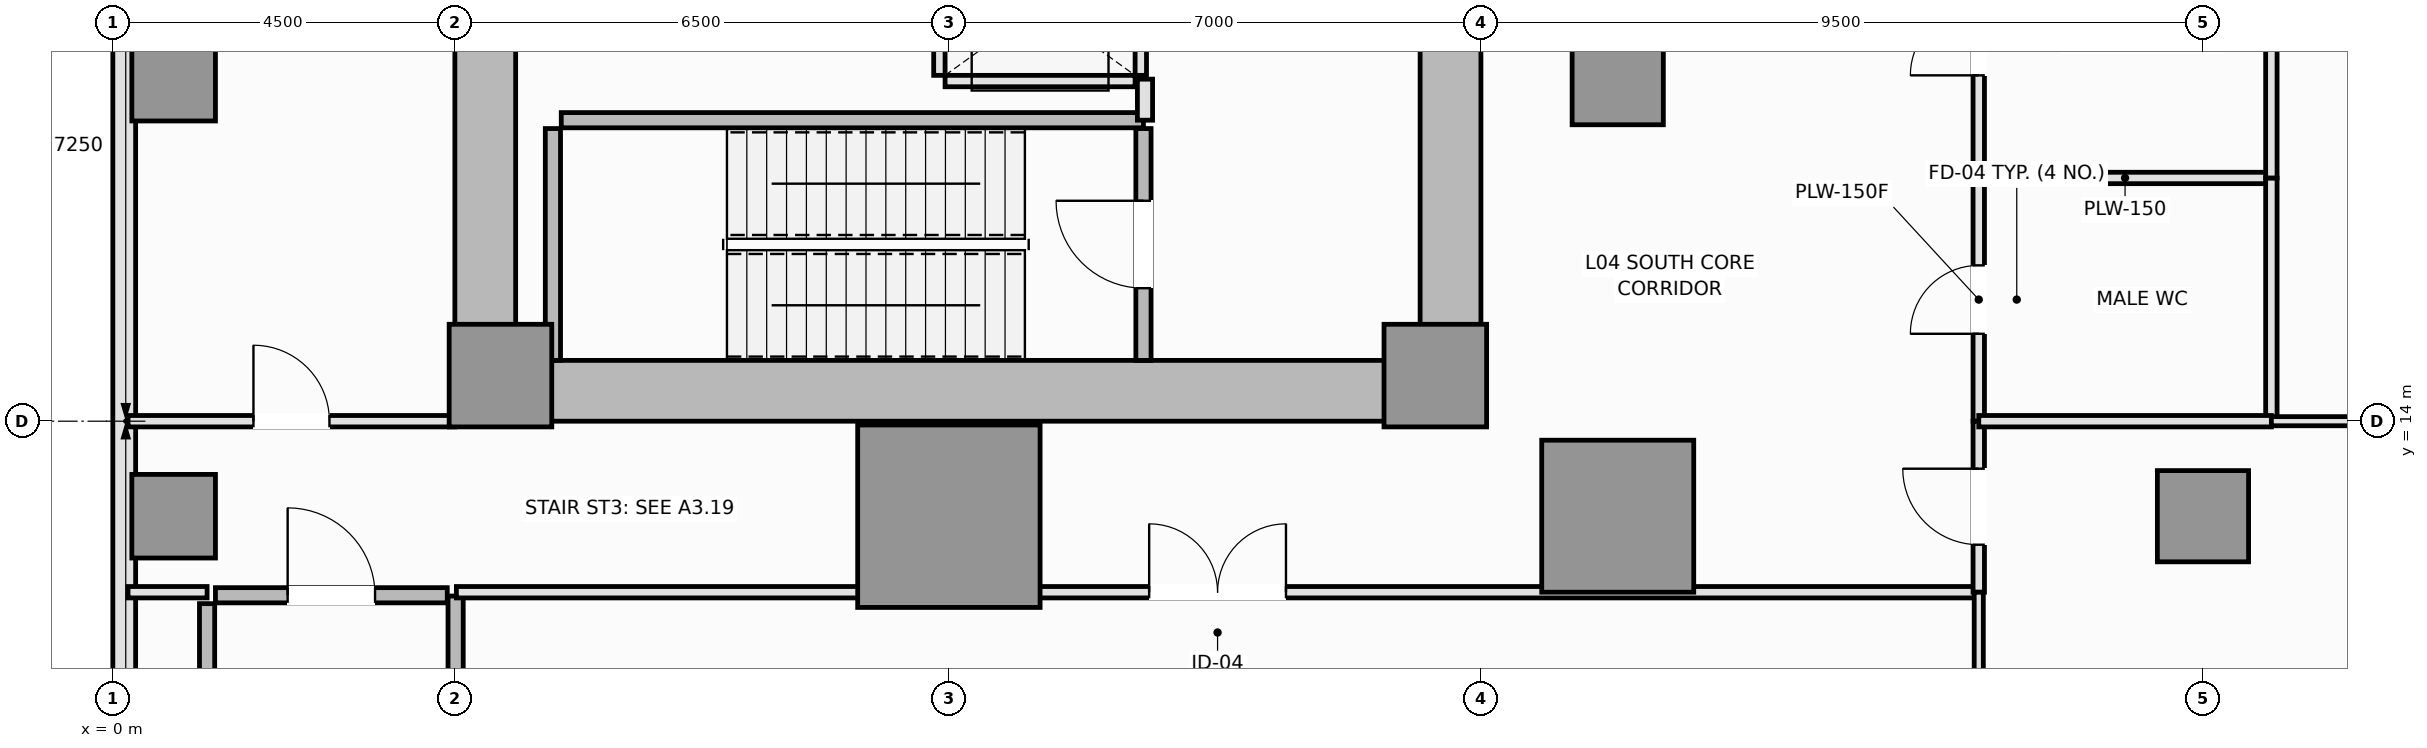
"""IFC4 building model, lengths in metres.
Left out: names, types, materials, properties, quantities, classifications, styles, units other than length and angle.
Written with IfcOpenShell. Run it as: python <this file> out.ifc"""

import sys

from ifc_helpers import new_model, si_unit, direction, frame, frame_2d, origin, origin_2d, place, context, subcontext, project, spatial, rectangle, extrude, element, fill, save


model = new_model("IFC4")
c1 = context("Model", 3, precision=1e-05, world=origin(), true_north=direction((0.0, 1.0)))
c2 = subcontext(c1, "Body", "Model", "MODEL_VIEW")
j1 = project(units=[si_unit("LENGTHUNIT", "METRE"), si_unit("PLANEANGLEUNIT", "RADIAN")], contexts=[c1])
p1 = place(None, origin())
s1 = spatial("IfcSite", under=j1, at=p1, CompositionType="ELEMENT")
p2 = place(p1, origin())
s2 = spatial("IfcBuilding", under=s1, at=p2, CompositionType="ELEMENT")
p3 = place(p2, frame((0.0, 0.0, 20.4)))
s3 = spatial("IfcBuildingStorey", under=s2, at=p3, CompositionType="ELEMENT", Elevation=20.4)
p4 = place(p3, frame((4.5, 14.4, 0.0), z_axis=(0.0, 0.0, 1.0), x_axis=(1.0, 0.0, 0.0)))
e1 = element("IfcWall", 1, at=p4, inside=s3, PredefinedType="SHEAR", context=c2, shape_type="SweptSolid", body=[
    extrude(rectangle(XDim=13.5, YDim=0.8, at=frame_2d((6.75, 0.0))), origin(), (0.0, 0.0, 1.0), 5.2),
])
p5 = place(p3, frame((4.9, 14.8, 0.0), z_axis=(0.0, 0.0, 1.0), x_axis=(0.0, 1.0, 0.0)))
e2 = element("IfcWall", 2, at=p5, inside=s3, PredefinedType="SHEAR", context=c2, shape_type="SweptSolid", body=[
    extrude(rectangle(XDim=20.9, YDim=0.8, at=frame_2d((10.45, 0.0))), origin(), (0.0, 0.0, 1.0), 5.2),
])
p6 = place(p3, frame((17.6, 14.8, 0.0), z_axis=(0.0, 0.0, 1.0), x_axis=(0.0, 1.0, 0.0)))
e3 = element("IfcWall", 3, at=p6, inside=s3, PredefinedType="SHEAR", context=c2, shape_type="SweptSolid", body=[
    extrude(rectangle(XDim=8.65, YDim=0.8, at=frame_2d((4.325, 0.0))), origin(), (0.0, 0.0, 1.0), 5.2),
])
p7 = place(p6, frame((4.1, 0.0, 0.0)))
e4 = element("IfcOpeningElement", 4, at=p7, cuts=e3, PredefinedType="OPENING", context=c2, shape_type="SweptSolid", body=[
    extrude(rectangle(XDim=1.1, YDim=2.15, at=frame_2d((0.55, 1.075))), frame((0.0, 0.41, 0.0), z_axis=(0.0, -1.0, 0.0), x_axis=(1.0, 0.0, 0.0)), (0.0, 0.0, 1.0), 0.82),
])
for number, where, z_axis, x_axis in (
    (5, (5.1, 14.6, 0.0), (0.0, 0.0, 1.0), (1.0, 0.0, 0.0)),
    (6, (17.4, 14.6, 0.0), (0.0, 0.0, 1.0), (1.0, 0.0, 0.0)),
):
    element("IfcColumn", number, at=place(p3, frame(where, z_axis=z_axis, x_axis=x_axis)), inside=s3, PredefinedType="PILASTER", context=c2, shape_type="SweptSolid", body=[
        extrude(rectangle(XDim=1.35, YDim=1.35, at=origin_2d()), origin(), (0.0, 0.0, 1.0), 5.2),
    ])
p8 = place(p3, frame((11.0, 12.75, 0.0), z_axis=(0.0, 0.0, 1.0), x_axis=(1.0, 0.0, 0.0)))
e7 = element("IfcColumn", 7, at=p8, inside=s3, PredefinedType="COLUMN", context=c2, shape_type="SweptSolid", body=[
    extrude(rectangle(XDim=2.4, YDim=2.4, at=origin_2d()), origin(), (0.0, 0.0, 1.0), 5.2),
])
p9 = place(p3, frame((27.5, 12.75, 0.0), z_axis=(0.0, 0.0, 1.0), x_axis=(1.0, 0.0, 0.0)))
e8 = element("IfcColumn", 8, at=p9, inside=s3, PredefinedType="COLUMN", context=c2, shape_type="SweptSolid", body=[
    extrude(rectangle(XDim=1.2, YDim=1.2, at=origin_2d()), origin(), (0.0, 0.0, 1.0), 5.2),
])
p10 = place(p3, frame((19.8, 12.75, 0.0), z_axis=(0.0, 0.0, 1.0), x_axis=(1.0, 0.0, 0.0)))
e9 = element("IfcColumn", 9, at=p10, inside=s3, PredefinedType="COLUMN", context=c2, shape_type="SweptSolid", body=[
    extrude(rectangle(XDim=2.0, YDim=2.0, at=origin_2d()), origin(), (0.0, 0.0, 1.0), 5.2),
])
p11 = place(p3, frame((19.8, 18.5, 0.0), z_axis=(0.0, 0.0, 1.0), x_axis=(1.0, 0.0, 0.0)))
e10 = element("IfcColumn", 10, at=p11, inside=s3, PredefinedType="COLUMN", context=c2, shape_type="SweptSolid", body=[
    extrude(rectangle(XDim=1.2, YDim=1.2, at=origin_2d()), origin(), (0.0, 0.0, 1.0), 5.2),
])
for number, where, z_axis, x_axis in (
    (11, (0.8, 12.75, 0.0), (0.0, 0.0, 1.0), (1.0, 0.0, 0.0)),
    (12, (0.8, 18.5, 0.0), (0.0, 0.0, 1.0), (1.0, 0.0, 0.0)),
):
    element("IfcColumn", number, at=place(p3, frame(where, z_axis=z_axis, x_axis=x_axis)), inside=s3, PredefinedType="COLUMN", context=c2, shape_type="SweptSolid", body=[
        extrude(rectangle(XDim=1.1, YDim=1.1, at=origin_2d()), origin(), (0.0, 0.0, 1.0), 5.2),
    ])
p12 = place(p3, frame((0.15, 50.35, 0.0), z_axis=(0.0, 0.0, 1.0), x_axis=(0.0, -1.0, 0.0)))
e13 = element("IfcWall", 13, at=p12, inside=s3, PredefinedType="SOLIDWALL", context=c2, shape_type="SweptSolid", body=[
    extrude(rectangle(XDim=50.2, YDim=0.3, at=frame_2d((25.1, 0.0))), origin(), (0.0, 0.0, 1.0), 5.02),
])
p13 = place(p12, frame((6.5, 0.0, 0.9)))
e14 = element("IfcOpeningElement", 14, at=p13, cuts=e13, PredefinedType="OPENING", context=c2, shape_type="SweptSolid", body=[
    extrude(rectangle(XDim=2.6, YDim=2.2, at=frame_2d((1.3, 1.1))), frame((0.0, 0.16, 0.0), z_axis=(0.0, -1.0, 0.0), x_axis=(1.0, 0.0, 0.0)), (0.0, 0.0, 1.0), 0.32),
])
p14 = place(p12, frame((42.0, 0.0, 0.9)))
e15 = element("IfcOpeningElement", 15, at=p14, cuts=e13, PredefinedType="OPENING", context=c2, shape_type="SweptSolid", body=[
    extrude(rectangle(XDim=2.6, YDim=2.2, at=frame_2d((1.3, 1.1))), frame((0.0, 0.16, 0.0), z_axis=(0.0, -1.0, 0.0), x_axis=(1.0, 0.0, 0.0)), (0.0, 0.0, 1.0), 0.32),
])
p15 = place(p3, frame((5.79, 14.8, 0.0), z_axis=(0.0, 0.0, 1.0), x_axis=(0.0, 1.0, 0.0)))
e16 = element("IfcWall", 16, at=p15, inside=s3, PredefinedType="SOLIDWALL", context=c2, shape_type="SweptSolid", body=[
    extrude(rectangle(XDim=3.05, YDim=0.2, at=frame_2d((1.525, 0.0))), origin(), (0.0, 0.0, 1.0), 5.2),
])
p16 = place(p3, frame((5.9, 17.96, 0.0), z_axis=(0.0, 0.0, 1.0), x_axis=(1.0, 0.0, 0.0)))
e17 = element("IfcWall", 17, at=p16, inside=s3, PredefinedType="SOLIDWALL", context=c2, shape_type="SweptSolid", body=[
    extrude(rectangle(XDim=7.66, YDim=0.2, at=frame_2d((3.83, 0.0))), origin(), (0.0, 0.0, 1.0), 5.2),
])
p17 = place(p3, frame((13.56, 14.8, 0.0), z_axis=(0.0, 0.0, 1.0), x_axis=(0.0, 1.0, 0.0)))
e18 = element("IfcWall", 18, at=p17, inside=s3, PredefinedType="SOLIDWALL", context=c2, shape_type="SweptSolid", body=[
    extrude(rectangle(XDim=3.05, YDim=0.2, at=frame_2d((1.525, 0.0))), origin(), (0.0, 0.0, 1.0), 5.2),
])
p18 = place(p17, frame((0.95, 0.0, 0.0)))
e19 = element("IfcOpeningElement", 19, at=p18, cuts=e18, PredefinedType="OPENING", context=c2, shape_type="SweptSolid", body=[
    extrude(rectangle(XDim=1.15, YDim=2.15, at=frame_2d((0.575, 1.075))), frame((0.0, 0.11, 0.0), z_axis=(0.0, -1.0, 0.0), x_axis=(1.0, 0.0, 0.0)), (0.0, 0.0, 1.0), 0.22),
])
p19 = place(p3, frame((1.24, 4.05, 0.0), z_axis=(0.0, 0.0, 1.0), x_axis=(0.0, 1.0, 0.0)))
e20 = element("IfcWall", 20, at=p19, inside=s3, PredefinedType="SOLIDWALL", context=c2, shape_type="SweptSolid", body=[
    extrude(rectangle(XDim=7.55, YDim=0.2, at=frame_2d((3.775, 0.0))), origin(), (0.0, 0.0, 1.0), 5.2),
])
p20 = place(p3, frame((4.51, 4.05, 0.0), z_axis=(0.0, 0.0, 1.0), x_axis=(0.0, 1.0, 0.0)))
e21 = element("IfcWall", 21, at=p20, inside=s3, PredefinedType="SOLIDWALL", context=c2, shape_type="SweptSolid", body=[
    extrude(rectangle(XDim=7.65, YDim=0.2, at=frame_2d((3.825, 0.0))), origin(), (0.0, 0.0, 1.0), 5.2),
])
p21 = place(p3, frame((1.35, 11.71, 0.0), z_axis=(0.0, 0.0, 1.0), x_axis=(1.0, 0.0, 0.0)))
e22 = element("IfcWall", 22, at=p21, inside=s3, PredefinedType="SOLIDWALL", context=c2, shape_type="SweptSolid", body=[
    extrude(rectangle(XDim=3.05, YDim=0.2, at=frame_2d((1.525, 0.0))), origin(), (0.0, 0.0, 1.0), 5.2),
])
p22 = place(p21, frame((0.95, 0.0, 0.0)))
e23 = element("IfcOpeningElement", 23, at=p22, cuts=e22, PredefinedType="OPENING", context=c2, shape_type="SweptSolid", body=[
    extrude(rectangle(XDim=1.15, YDim=2.15, at=frame_2d((0.575, 1.075))), frame((0.0, 0.11, 0.0), z_axis=(0.0, -1.0, 0.0), x_axis=(1.0, 0.0, 0.0)), (0.0, 0.0, 1.0), 0.22),
])
p23 = place(p3, frame((10.95, 18.475, 0.0), z_axis=(0.0, 0.0, 1.0), x_axis=(1.0, 0.0, 0.0)))
e24 = element("IfcWall", 24, at=p23, inside=s3, PredefinedType="PARTITIONING", context=c2, shape_type="SweptSolid", body=[
    extrude(rectangle(XDim=2.5, YDim=0.15, at=frame_2d((1.25, 0.0))), origin(), (0.0, 0.0, 1.0), 5.02),
])
p24 = place(p3, frame((10.875, 18.55, 0.0), z_axis=(0.0, 0.0, 1.0), x_axis=(0.0, 1.0, 0.0)))
e25 = element("IfcWall", 25, at=p24, inside=s3, PredefinedType="PARTITIONING", context=c2, shape_type="SweptSolid", body=[
    extrude(rectangle(XDim=1.8, YDim=0.15, at=frame_2d((0.9, 0.0))), origin(), (0.0, 0.0, 1.0), 5.02),
])
p25 = place(p3, frame((13.525, 18.55, 0.0), z_axis=(0.0, 0.0, 1.0), x_axis=(0.0, 1.0, 0.0)))
e26 = element("IfcWall", 26, at=p25, inside=s3, PredefinedType="PARTITIONING", context=c2, shape_type="SweptSolid", body=[
    extrude(rectangle(XDim=1.8, YDim=0.15, at=frame_2d((0.9, 0.0))), origin(), (0.0, 0.0, 1.0), 5.02),
])
p26 = place(p25, frame((0.35, 0.0, 0.0)))
e27 = element("IfcOpeningElement", 27, at=p26, cuts=e26, PredefinedType="OPENING", context=c2, shape_type="SweptSolid", body=[
    extrude(rectangle(XDim=1.1, YDim=2.2, at=frame_2d((0.55, 1.1))), frame((0.0, 0.085, 0.0), z_axis=(0.0, -1.0, 0.0), x_axis=(1.0, 0.0, 0.0)), (0.0, 0.0, 1.0), 0.17),
])
p27 = place(p3, frame((13.58, 17.96, 0.0), z_axis=(0.0, 0.0, 1.0), x_axis=(0.0, 1.0, 0.0)))
e28 = element("IfcWall", 28, at=p27, inside=s3, PredefinedType="PARTITIONING", context=c2, shape_type="SweptSolid", body=[
    extrude(rectangle(XDim=0.54, YDim=0.2, at=frame_2d((0.27, 0.0))), origin(), (0.0, 0.0, 1.0), 5.02),
])
p28 = place(p3, frame((24.55, 14.0, 0.0), z_axis=(0.0, 0.0, 1.0), x_axis=(0.0, 1.0, 0.0)))
e29 = element("IfcWall", 29, at=p28, inside=s3, PredefinedType="PLUMBINGWALL", context=c2, shape_type="SweptSolid", body=[
    extrude(rectangle(XDim=3.2, YDim=0.15, at=frame_2d((1.6, 0.0))), origin(), (0.0, 0.0, 1.0), 5.02),
])
p29 = place(p28, frame((1.15, 0.0, 0.0)))
e30 = element("IfcOpeningElement", 30, at=p29, cuts=e29, PredefinedType="OPENING", context=c2, shape_type="SweptSolid", body=[
    extrude(rectangle(XDim=0.9, YDim=2.1, at=frame_2d((0.45, 1.05))), frame((0.0, 0.085, 0.0), z_axis=(0.0, -1.0, 0.0), x_axis=(1.0, 0.0, 0.0)), (0.0, 0.0, 1.0), 0.17),
])
p30 = place(p3, frame((24.55, 17.2, 0.0), z_axis=(0.0, 0.0, 1.0), x_axis=(0.0, 1.0, 0.0)))
e31 = element("IfcWall", 31, at=p30, inside=s3, PredefinedType="PLUMBINGWALL", context=c2, shape_type="SweptSolid", body=[
    extrude(rectangle(XDim=3.6, YDim=0.15, at=frame_2d((1.8, 0.0))), origin(), (0.0, 0.0, 1.0), 5.02),
])
p31 = place(p30, frame((1.35, 0.0, 0.0)))
e32 = element("IfcOpeningElement", 32, at=p31, cuts=e31, PredefinedType="OPENING", context=c2, shape_type="SweptSolid", body=[
    extrude(rectangle(XDim=0.9, YDim=2.1, at=frame_2d((0.45, 1.05))), frame((0.0, 0.085, 0.0), z_axis=(0.0, -1.0, 0.0), x_axis=(1.0, 0.0, 0.0)), (0.0, 0.0, 1.0), 0.17),
])
p32 = place(p3, frame((0.2, 11.75, 0.0), z_axis=(0.0, 0.0, 1.0), x_axis=(1.0, 0.0, 0.0)))
e33 = element("IfcWall", 33, at=p32, inside=s3, PredefinedType="PARTITIONING", context=c2, shape_type="SweptSolid", body=[
    extrude(rectangle(XDim=1.04, YDim=0.15, at=frame_2d((0.52, 0.0))), origin(), (0.0, 0.0, 1.0), 5.02),
])
p33 = place(p3, frame((4.52, 11.75, 0.0), z_axis=(0.0, 0.0, 1.0), x_axis=(1.0, 0.0, 0.0)))
e34 = element("IfcWall", 34, at=p33, inside=s3, PredefinedType="PARTITIONING", context=c2, shape_type="SweptSolid", body=[
    extrude(rectangle(XDim=20.03, YDim=0.15, at=frame_2d((10.015, 0.0))), origin(), (0.0, 0.0, 1.0), 5.02),
])
p34 = place(p33, frame((9.115, 0.0, 0.0)))
e35 = element("IfcOpeningElement", 35, at=p34, cuts=e34, PredefinedType="OPENING", context=c2, shape_type="SweptSolid", body=[
    extrude(rectangle(XDim=1.8, YDim=2.2, at=frame_2d((0.9, 1.1))), frame((0.0, 0.085, 0.0), z_axis=(0.0, -1.0, 0.0), x_axis=(1.0, 0.0, 0.0)), (0.0, 0.0, 1.0), 0.17),
])
p35 = place(p3, frame((0.2, 14.0, 0.0), z_axis=(0.0, 0.0, 1.0), x_axis=(1.0, 0.0, 0.0)))
e36 = element("IfcWall", 36, at=p35, inside=s3, PredefinedType="PARTITIONING", context=c2, shape_type="SweptSolid", body=[
    extrude(rectangle(XDim=4.3, YDim=0.15, at=frame_2d((2.15, 0.0))), origin(), (0.0, 0.0, 1.0), 5.02),
])
p36 = place(p35, frame((1.65, 0.0, 0.0)))
e37 = element("IfcOpeningElement", 37, at=p36, cuts=e36, PredefinedType="OPENING", context=c2, shape_type="SweptSolid", body=[
    extrude(rectangle(XDim=1.0, YDim=2.15, at=frame_2d((0.5, 1.075))), frame((0.0, 0.085, 0.0), z_axis=(0.0, -1.0, 0.0), x_axis=(1.0, 0.0, 0.0)), (0.0, 0.0, 1.0), 0.17),
])
p37 = place(p3, frame((24.55, 11.75, 0.0), z_axis=(0.0, 0.0, 1.0), x_axis=(0.0, 1.0, 0.0)))
e38 = element("IfcWall", 38, at=p37, inside=s3, PredefinedType="PARTITIONING", context=c2, shape_type="SweptSolid", body=[
    extrude(rectangle(XDim=2.25, YDim=0.15, at=frame_2d((1.125, 0.0))), origin(), (0.0, 0.0, 1.0), 5.02),
])
p38 = place(p37, frame((0.625, 0.0, 0.0)))
e39 = element("IfcOpeningElement", 39, at=p38, cuts=e38, PredefinedType="OPENING", context=c2, shape_type="SweptSolid", body=[
    extrude(rectangle(XDim=1.0, YDim=2.15, at=frame_2d((0.5, 1.075))), frame((0.0, 0.085, 0.0), z_axis=(0.0, -1.0, 0.0), x_axis=(1.0, 0.0, 0.0)), (0.0, 0.0, 1.0), 0.17),
])
p39 = place(p3, frame((24.55, 0.2, 0.0), z_axis=(0.0, 0.0, 1.0), x_axis=(0.0, 1.0, 0.0)))
e40 = element("IfcWall", 40, at=p39, inside=s3, PredefinedType="PARTITIONING", context=c2, shape_type="SweptSolid", body=[
    extrude(rectangle(XDim=11.55, YDim=0.12, at=frame_2d((5.775, 0.0))), origin(), (0.0, 0.0, 1.0), 5.02),
])
p40 = place(p3, frame((24.55, 17.2, 0.0), z_axis=(0.0, 0.0, 1.0), x_axis=(1.0, 0.0, 0.0)))
e41 = element("IfcWall", 41, at=p40, inside=s3, PredefinedType="PLUMBINGWALL", context=c2, shape_type="SweptSolid", body=[
    extrude(rectangle(XDim=3.85, YDim=0.15, at=frame_2d((1.925, 0.0))), origin(), (0.0, 0.0, 1.0), 5.02),
])
p41 = place(p3, frame((28.4, 14.0, 0.0), z_axis=(0.0, 0.0, 1.0), x_axis=(0.0, 1.0, 0.0)))
e42 = element("IfcWall", 42, at=p41, inside=s3, PredefinedType="PLUMBINGWALL", context=c2, shape_type="SweptSolid", body=[
    extrude(rectangle(XDim=3.2, YDim=0.15, at=frame_2d((1.6, 0.0))), origin(), (0.0, 0.0, 1.0), 5.02),
])
p42 = place(p3, frame((24.55, 14.0, 0.0), z_axis=(0.0, 0.0, 1.0), x_axis=(1.0, 0.0, 0.0)))
e43 = element("IfcWall", 43, at=p42, inside=s3, PredefinedType="PLUMBINGWALL", context=c2, shape_type="SweptSolid", body=[
    extrude(rectangle(XDim=3.85, YDim=0.15, at=frame_2d((1.925, 0.0))), origin(), (0.0, 0.0, 1.0), 5.02),
])
p43 = place(p3, frame((28.4, 17.2, 0.0), z_axis=(0.0, 0.0, 1.0), x_axis=(0.0, 1.0, 0.0)))
e44 = element("IfcWall", 44, at=p43, inside=s3, PredefinedType="PLUMBINGWALL", context=c2, shape_type="SweptSolid", body=[
    extrude(rectangle(XDim=3.6, YDim=0.15, at=frame_2d((1.8, 0.0))), origin(), (0.0, 0.0, 1.0), 5.02),
])
p44 = place(p3, frame((28.4, 14.0, 0.0), z_axis=(0.0, 0.0, 1.0), x_axis=(1.0, 0.0, 0.0)))
e45 = element("IfcWall", 45, at=p44, inside=s3, PredefinedType="PARTITIONING", context=c2, shape_type="SweptSolid", body=[
    extrude(rectangle(XDim=9.8, YDim=0.12, at=frame_2d((4.9, 0.0))), origin(), (0.0, 0.0, 1.0), 5.02),
])
p45 = place(p18, origin())
e46 = element("IfcDoor", 46, at=p45, inside=s3, OperationType="SINGLE_SWING_RIGHT", PredefinedType="DOOR", context=c2, shape_type="SweptSolid", body=[
    extrude(rectangle(XDim=1.15, YDim=2.15, at=frame_2d((0.575, 1.075))), frame((0.0, 0.025, 0.0), z_axis=(0.0, -1.0, 0.0), x_axis=(1.0, 0.0, 0.0)), (0.0, 0.0, 1.0), 0.05),
])
fill(e19, e46)
p46 = place(p22, origin())
e47 = element("IfcDoor", 47, at=p46, inside=s3, OperationType="SINGLE_SWING_LEFT", PredefinedType="DOOR", context=c2, shape_type="SweptSolid", body=[
    extrude(rectangle(XDim=1.15, YDim=2.15, at=frame_2d((0.575, 1.075))), frame((0.0, 0.025, 0.0), z_axis=(0.0, -1.0, 0.0), x_axis=(1.0, 0.0, 0.0)), (0.0, 0.0, 1.0), 0.05),
])
fill(e23, e47)
p47 = place(p29, origin())
e48 = element("IfcDoor", 48, at=p47, inside=s3, OperationType="SINGLE_SWING_LEFT", PredefinedType="DOOR", context=c2, shape_type="SweptSolid", body=[
    extrude(rectangle(XDim=0.9, YDim=2.1, at=frame_2d((0.45, 1.05))), frame((0.0, 0.025, 0.0), z_axis=(0.0, -1.0, 0.0), x_axis=(1.0, 0.0, 0.0)), (0.0, 0.0, 1.0), 0.05),
])
fill(e30, e48)
p48 = place(p31, origin())
e49 = element("IfcDoor", 49, at=p48, inside=s3, OperationType="SINGLE_SWING_LEFT", PredefinedType="DOOR", context=c2, shape_type="SweptSolid", body=[
    extrude(rectangle(XDim=0.9, YDim=2.1, at=frame_2d((0.45, 1.05))), frame((0.0, 0.025, 0.0), z_axis=(0.0, -1.0, 0.0), x_axis=(1.0, 0.0, 0.0)), (0.0, 0.0, 1.0), 0.05),
])
fill(e32, e49)
p49 = place(p34, origin())
e50 = element("IfcDoor", 50, at=p49, inside=s3, OperationType="DOUBLE_DOOR_SINGLE_SWING", PredefinedType="DOOR", context=c2, shape_type="SweptSolid", body=[
    extrude(rectangle(XDim=1.8, YDim=2.2, at=frame_2d((0.9, 1.1))), frame((0.0, 0.025, 0.0), z_axis=(0.0, -1.0, 0.0), x_axis=(1.0, 0.0, 0.0)), (0.0, 0.0, 1.0), 0.05),
])
fill(e35, e50)
p50 = place(p36, origin())
e51 = element("IfcDoor", 51, at=p50, inside=s3, OperationType="SINGLE_SWING_LEFT", PredefinedType="DOOR", context=c2, shape_type="SweptSolid", body=[
    extrude(rectangle(XDim=1.0, YDim=2.15, at=frame_2d((0.5, 1.075))), frame((0.0, 0.025, 0.0), z_axis=(0.0, -1.0, 0.0), x_axis=(1.0, 0.0, 0.0)), (0.0, 0.0, 1.0), 0.05),
])
fill(e37, e51)
p51 = place(p38, origin())
e52 = element("IfcDoor", 52, at=p51, inside=s3, OperationType="SINGLE_SWING_RIGHT", PredefinedType="DOOR", context=c2, shape_type="SweptSolid", body=[
    extrude(rectangle(XDim=1.0, YDim=2.15, at=frame_2d((0.5, 1.075))), frame((0.0, 0.025, 0.0), z_axis=(0.0, -1.0, 0.0), x_axis=(1.0, 0.0, 0.0)), (0.0, 0.0, 1.0), 0.05),
])
fill(e39, e52)
save(model, sys.argv[1])
